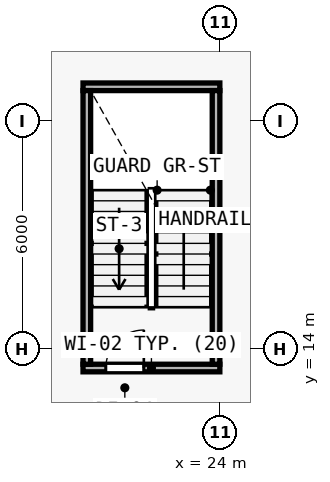
"""IFC4 building model, lengths in metres.
Left out: names, types, materials, properties, quantities, classifications, styles, units other than length and angle.
Written with IfcOpenShell. Run it as: python <this file> out.ifc"""

import sys

from ifc_helpers import new_model, si_unit, direction, frame, frame_2d, origin, place, context, subcontext, project, spatial, rectangle, extrude, element, fill, save


model = new_model("IFC4")
c1 = context("Model", 3, precision=1e-05, world=origin(), true_north=direction((0.0, 1.0)))
c2 = subcontext(c1, "Body", "Model", "MODEL_VIEW")
j1 = project(units=[si_unit("LENGTHUNIT", "METRE"), si_unit("PLANEANGLEUNIT", "RADIAN")], contexts=[c1])
p1 = place(None, origin())
s1 = spatial("IfcSite", under=j1, at=p1, CompositionType="ELEMENT")
p2 = place(p1, origin())
s2 = spatial("IfcBuilding", under=s1, at=p2, CompositionType="ELEMENT")
p3 = place(p2, frame((0.0, 0.0, 13.4)))
s3 = spatial("IfcBuildingStorey", under=s2, at=p3, CompositionType="ELEMENT", Elevation=13.4)
p4 = place(p3, frame((20.4, 13.5, 0.0), z_axis=(0.0, 0.0, 1.0), x_axis=(1.0, 0.0, 0.0)))
e1 = element("IfcWall", 1, at=p4, inside=s3, PredefinedType="SOLIDWALL", context=c2, shape_type="SweptSolid", body=[
    extrude(rectangle(XDim=3.6, YDim=0.2, at=frame_2d((1.8, 0.0))), origin(), (0.0, 0.0, 1.0), 3.92),
])
p5 = place(p4, frame((0.6, 0.0, 0.0)))
e2 = element("IfcOpeningElement", 2, at=p5, cuts=e1, PredefinedType="OPENING", context=c2, shape_type="SweptSolid", body=[
    extrude(rectangle(XDim=1.0, YDim=2.15, at=frame_2d((0.5, 1.075))), frame((0.0, 0.11, 0.0), z_axis=(0.0, -1.0, 0.0), x_axis=(1.0, 0.0, 0.0)), (0.0, 0.0, 1.0), 0.22),
])
p6 = place(p3, frame((20.4, 20.9, 0.0), z_axis=(0.0, 0.0, 1.0), x_axis=(1.0, 0.0, 0.0)))
e3 = element("IfcWall", 3, at=p6, inside=s3, PredefinedType="SOLIDWALL", context=c2, shape_type="SweptSolid", body=[
    extrude(rectangle(XDim=3.6, YDim=0.2, at=frame_2d((1.8, 0.0))), origin(), (0.0, 0.0, 1.0), 3.92),
])
for number, where, z_axis, x_axis in (
    (4, (20.5, 13.6, 0.0), (0.0, 0.0, 1.0), (0.0, 1.0, 0.0)),
    (5, (23.9, 13.6, 0.0), (0.0, 0.0, 1.0), (0.0, 1.0, 0.0)),
):
    element("IfcWall", number, at=place(p3, frame(where, z_axis=z_axis, x_axis=x_axis)), inside=s3, PredefinedType="SOLIDWALL", context=c2, shape_type="SweptSolid", body=[
        extrude(rectangle(XDim=7.2, YDim=0.2, at=frame_2d((3.6, 0.0))), origin(), (0.0, 0.0, 1.0), 3.92),
    ])
p7 = place(p5, origin())
e6 = element("IfcDoor", 6, at=p7, inside=s3, OperationType="SINGLE_SWING_RIGHT", PredefinedType="DOOR", context=c2, shape_type="SweptSolid", body=[
    extrude(rectangle(XDim=1.0, YDim=2.15, at=frame_2d((0.5, 1.075))), frame((0.0, 0.025, 0.0), z_axis=(0.0, -1.0, 0.0), x_axis=(1.0, 0.0, 0.0)), (0.0, 0.0, 1.0), 0.05),
])
fill(e2, e6)
save(model, sys.argv[1])
